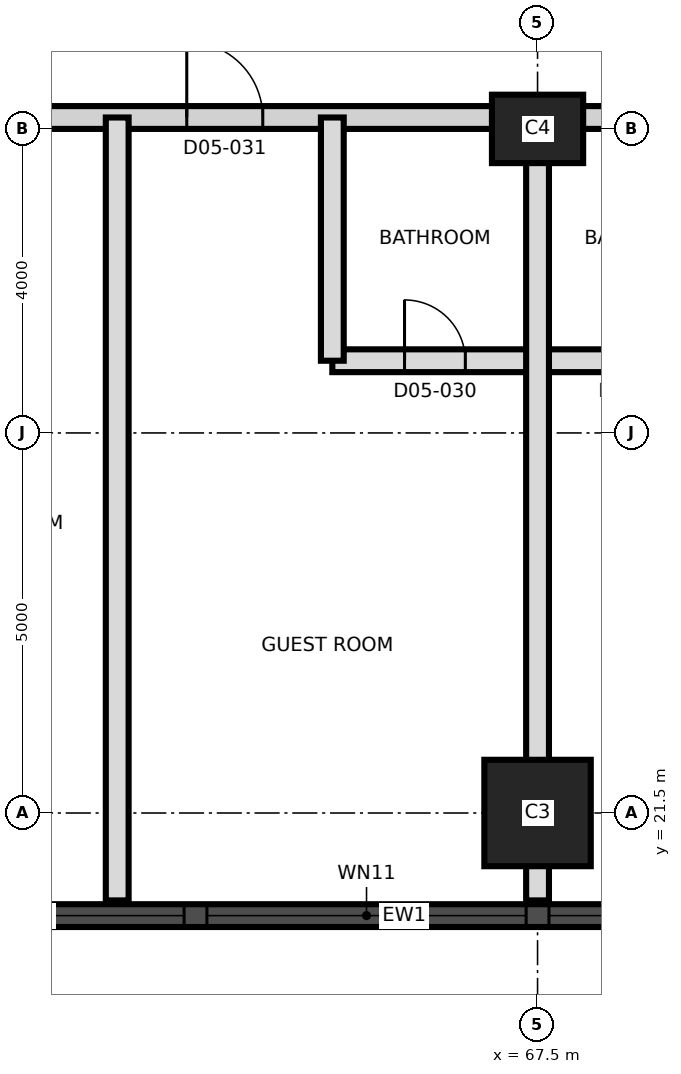
"""IFC4 building model, lengths in metres.
Left out: names, types, materials, properties, quantities, classifications, styles, units other than length and angle.
Written with IfcOpenShell. Run it as: python <this file> out.ifc"""

import sys

from ifc_helpers import new_model, si_unit, direction, frame, frame_2d, origin, origin_2d, place, context, subcontext, project, spatial, rectangle, extrude, element, fill, save


model = new_model("IFC4")
c1 = context("Model", 3, precision=1e-05, world=origin(), true_north=direction((0.0, 1.0)))
c2 = subcontext(c1, "Body", "Model", "MODEL_VIEW")
j1 = project(units=[si_unit("LENGTHUNIT", "METRE"), si_unit("PLANEANGLEUNIT", "RADIAN")], contexts=[c1])
p1 = place(None, origin())
s1 = spatial("IfcSite", under=j1, at=p1, CompositionType="ELEMENT")
p2 = place(p1, origin())
s2 = spatial("IfcBuilding", under=s1, at=p2, CompositionType="ELEMENT")
p3 = place(p2, frame((0.0, 0.0, 77.9)))
s3 = spatial("IfcBuildingStorey", under=s2, at=p3, CompositionType="ELEMENT", Elevation=77.9)
p4 = place(p3, frame((67.5, 21.5, 0.0), z_axis=(0.0, 0.0, 1.0), x_axis=(1.0, 0.0, 0.0)))
e1 = element("IfcColumn", 1, at=p4, inside=s3, PredefinedType="COLUMN", context=c2, shape_type="SweptSolid", body=[
    extrude(rectangle(XDim=1.4, YDim=1.4, at=origin_2d()), origin(), (0.0, 0.0, 1.0), 3.7),
])
p5 = place(p3, frame((67.5, 30.5, 0.0), z_axis=(0.0, 0.0, 1.0), x_axis=(1.0, 0.0, 0.0)))
e2 = element("IfcColumn", 2, at=p5, inside=s3, PredefinedType="COLUMN", context=c2, shape_type="SweptSolid", body=[
    extrude(rectangle(XDim=1.2, YDim=0.9, at=origin_2d()), origin(), (0.0, 0.0, 1.0), 3.7),
])
p6 = place(p3, frame((44.011, 20.15, 0.0), z_axis=(0.0, 0.0, 1.0), x_axis=(1.0, 0.0, 0.0)))
e3 = element("IfcWall", 3, at=p6, inside=s3, PredefinedType="SOLIDWALL", context=c2, shape_type="SweptSolid", body=[
    extrude(rectangle(XDim=43.476, YDim=0.3, at=frame_2d((21.738, 0.0))), origin(), (0.0, 0.0, 1.0), 3.4),
])
p7 = place(p6, frame((1.845, 0.0, 0.3)))
e4 = element("IfcOpeningElement", 4, at=p7, cuts=e3, PredefinedType="OPENING", context=c2, shape_type="SweptSolid", body=[
    extrude(rectangle(XDim=1.8, YDim=2.4, at=frame_2d((0.9, 1.2))), frame((0.0, 0.16, 0.0), z_axis=(0.0, -1.0, 0.0), x_axis=(1.0, 0.0, 0.0)), (0.0, 0.0, 1.0), 0.32),
])
p8 = place(p6, frame((5.639, 0.0, 0.9)))
e5 = element("IfcOpeningElement", 5, at=p8, cuts=e3, PredefinedType="OPENING", context=c2, shape_type="SweptSolid", body=[
    extrude(rectangle(XDim=4.2, YDim=1.5, at=frame_2d((2.1, 0.75))), frame((0.0, 0.16, 0.0), z_axis=(0.0, -1.0, 0.0), x_axis=(1.0, 0.0, 0.0)), (0.0, 0.0, 1.0), 0.32),
])
p9 = place(p6, frame((10.139, 0.0, 0.9)))
e6 = element("IfcOpeningElement", 6, at=p9, cuts=e3, PredefinedType="OPENING", context=c2, shape_type="SweptSolid", body=[
    extrude(rectangle(XDim=4.2, YDim=1.5, at=frame_2d((2.1, 0.75))), frame((0.0, 0.16, 0.0), z_axis=(0.0, -1.0, 0.0), x_axis=(1.0, 0.0, 0.0)), (0.0, 0.0, 1.0), 0.32),
])
p10 = place(p6, frame((14.639, 0.0, 0.9)))
e7 = element("IfcOpeningElement", 7, at=p10, cuts=e3, PredefinedType="OPENING", context=c2, shape_type="SweptSolid", body=[
    extrude(rectangle(XDim=4.2, YDim=1.5, at=frame_2d((2.1, 0.75))), frame((0.0, 0.16, 0.0), z_axis=(0.0, -1.0, 0.0), x_axis=(1.0, 0.0, 0.0)), (0.0, 0.0, 1.0), 0.32),
])
p11 = place(p6, frame((19.139, 0.0, 0.9)))
e8 = element("IfcOpeningElement", 8, at=p11, cuts=e3, PredefinedType="OPENING", context=c2, shape_type="SweptSolid", body=[
    extrude(rectangle(XDim=4.2, YDim=1.5, at=frame_2d((2.1, 0.75))), frame((0.0, 0.16, 0.0), z_axis=(0.0, -1.0, 0.0), x_axis=(1.0, 0.0, 0.0)), (0.0, 0.0, 1.0), 0.32),
])
p12 = place(p6, frame((23.639, 0.0, 0.9)))
e9 = element("IfcOpeningElement", 9, at=p12, cuts=e3, PredefinedType="OPENING", context=c2, shape_type="SweptSolid", body=[
    extrude(rectangle(XDim=4.2, YDim=1.5, at=frame_2d((2.1, 0.75))), frame((0.0, 0.16, 0.0), z_axis=(0.0, -1.0, 0.0), x_axis=(1.0, 0.0, 0.0)), (0.0, 0.0, 1.0), 0.32),
])
p13 = place(p6, frame((28.139, 0.0, 0.9)))
e10 = element("IfcOpeningElement", 10, at=p13, cuts=e3, PredefinedType="OPENING", context=c2, shape_type="SweptSolid", body=[
    extrude(rectangle(XDim=4.2, YDim=1.5, at=frame_2d((2.1, 0.75))), frame((0.0, 0.16, 0.0), z_axis=(0.0, -1.0, 0.0), x_axis=(1.0, 0.0, 0.0)), (0.0, 0.0, 1.0), 0.32),
])
p14 = place(p6, frame((32.639, 0.0, 0.9)))
e11 = element("IfcOpeningElement", 11, at=p14, cuts=e3, PredefinedType="OPENING", context=c2, shape_type="SweptSolid", body=[
    extrude(rectangle(XDim=4.2, YDim=1.5, at=frame_2d((2.1, 0.75))), frame((0.0, 0.16, 0.0), z_axis=(0.0, -1.0, 0.0), x_axis=(1.0, 0.0, 0.0)), (0.0, 0.0, 1.0), 0.32),
])
p15 = place(p6, frame((37.139, 0.0, 0.9)))
e12 = element("IfcOpeningElement", 12, at=p15, cuts=e3, PredefinedType="OPENING", context=c2, shape_type="SweptSolid", body=[
    extrude(rectangle(XDim=4.2, YDim=1.5, at=frame_2d((2.1, 0.75))), frame((0.0, 0.16, 0.0), z_axis=(0.0, -1.0, 0.0), x_axis=(1.0, 0.0, 0.0)), (0.0, 0.0, 1.0), 0.32),
])
p16 = place(p3, frame((64.8, 27.45, 0.0), z_axis=(0.0, 0.0, 1.0), x_axis=(1.0, 0.0, 0.0)))
e13 = element("IfcWall", 13, at=p16, inside=s3, PredefinedType="PARTITIONING", context=c2, shape_type="SweptSolid", body=[
    extrude(rectangle(XDim=5.4, YDim=0.3, at=frame_2d((2.7, 0.0))), origin(), (0.0, 0.0, 1.0), 3.4),
])
p17 = place(p16, frame((0.95, 0.0, 0.0)))
e14 = element("IfcOpeningElement", 14, at=p17, cuts=e13, PredefinedType="OPENING", context=c2, shape_type="SweptSolid", body=[
    extrude(rectangle(XDim=0.8, YDim=2.1, at=frame_2d((0.4, 1.05))), frame((0.0, 0.16, 0.0), z_axis=(0.0, -1.0, 0.0), x_axis=(1.0, 0.0, 0.0)), (0.0, 0.0, 1.0), 0.32),
])
p18 = place(p16, frame((3.65, 0.0, 0.0)))
e15 = element("IfcOpeningElement", 15, at=p18, cuts=e13, PredefinedType="OPENING", context=c2, shape_type="SweptSolid", body=[
    extrude(rectangle(XDim=0.8, YDim=2.1, at=frame_2d((0.4, 1.05))), frame((0.0, 0.16, 0.0), z_axis=(0.0, -1.0, 0.0), x_axis=(1.0, 0.0, 0.0)), (0.0, 0.0, 1.0), 0.32),
])
p19 = place(p3, frame((58.95, 30.65, 0.0), z_axis=(0.0, 0.0, 1.0), x_axis=(1.0, 0.0, 0.0)))
e16 = element("IfcWall", 16, at=p19, inside=s3, PredefinedType="PARTITIONING", context=c2, shape_type="SweptSolid", body=[
    extrude(rectangle(XDim=26.38, YDim=0.3, at=frame_2d((13.19, 0.0))), origin(), (0.0, 0.0, 1.0), 3.4),
])
p20 = place(p19, frame((0.685, 0.0, 0.0)))
e17 = element("IfcOpeningElement", 17, at=p20, cuts=e16, PredefinedType="OPENING", context=c2, shape_type="SweptSolid", body=[
    extrude(rectangle(XDim=1.2, YDim=2.1, at=frame_2d((0.6, 1.05))), frame((0.0, 0.16, 0.0), z_axis=(0.0, -1.0, 0.0), x_axis=(1.0, 0.0, 0.0)), (0.0, 0.0, 1.0), 0.32),
])
p21 = place(p19, frame((3.935, 0.0, 0.0)))
e18 = element("IfcOpeningElement", 18, at=p21, cuts=e16, PredefinedType="OPENING", context=c2, shape_type="SweptSolid", body=[
    extrude(rectangle(XDim=1.0, YDim=2.1, at=frame_2d((0.5, 1.05))), frame((0.0, 0.16, 0.0), z_axis=(0.0, -1.0, 0.0), x_axis=(1.0, 0.0, 0.0)), (0.0, 0.0, 1.0), 0.32),
])
p22 = place(p19, frame((11.965, 0.0, 0.0)))
e19 = element("IfcOpeningElement", 19, at=p22, cuts=e16, PredefinedType="OPENING", context=c2, shape_type="SweptSolid", body=[
    extrude(rectangle(XDim=1.0, YDim=2.1, at=frame_2d((0.5, 1.05))), frame((0.0, 0.16, 0.0), z_axis=(0.0, -1.0, 0.0), x_axis=(1.0, 0.0, 0.0)), (0.0, 0.0, 1.0), 0.32),
])
p23 = place(p19, frame((14.915, 0.0, 0.0)))
e20 = element("IfcOpeningElement", 20, at=p23, cuts=e16, PredefinedType="OPENING", context=c2, shape_type="SweptSolid", body=[
    extrude(rectangle(XDim=1.4, YDim=2.1, at=frame_2d((0.7, 1.05))), frame((0.0, 0.16, 0.0), z_axis=(0.0, -1.0, 0.0), x_axis=(1.0, 0.0, 0.0)), (0.0, 0.0, 1.0), 0.32),
])
p24 = place(p19, frame((18.685, 0.0, 0.0)))
e21 = element("IfcOpeningElement", 21, at=p24, cuts=e16, PredefinedType="OPENING", context=c2, shape_type="SweptSolid", body=[
    extrude(rectangle(XDim=1.2, YDim=2.1, at=frame_2d((0.6, 1.05))), frame((0.0, 0.16, 0.0), z_axis=(0.0, -1.0, 0.0), x_axis=(1.0, 0.0, 0.0)), (0.0, 0.0, 1.0), 0.32),
])
p25 = place(p19, frame((21.935, 0.0, 0.0)))
e22 = element("IfcOpeningElement", 22, at=p25, cuts=e16, PredefinedType="OPENING", context=c2, shape_type="SweptSolid", body=[
    extrude(rectangle(XDim=1.0, YDim=2.1, at=frame_2d((0.5, 1.05))), frame((0.0, 0.16, 0.0), z_axis=(0.0, -1.0, 0.0), x_axis=(1.0, 0.0, 0.0)), (0.0, 0.0, 1.0), 0.32),
])
p26 = place(p3, frame((61.97, 20.35, 0.0), z_axis=(0.0, 0.0, 1.0), x_axis=(0.0, 1.0, 0.0)))
e23 = element("IfcWall", 23, at=p26, inside=s3, PredefinedType="PARTITIONING", context=c2, shape_type="SweptSolid", body=[
    extrude(rectangle(XDim=10.3, YDim=0.3, at=frame_2d((5.15, 0.0))), origin(), (0.0, 0.0, 1.0), 3.4),
])
p27 = place(p3, frame((64.8, 27.45, 0.0), z_axis=(0.0, 0.0, 1.0), x_axis=(0.0, 1.0, 0.0)))
e24 = element("IfcWall", 24, at=p27, inside=s3, PredefinedType="PARTITIONING", context=c2, shape_type="SweptSolid", body=[
    extrude(rectangle(XDim=3.2, YDim=0.3, at=frame_2d((1.6, 0.0))), origin(), (0.0, 0.0, 1.0), 3.4),
])
p28 = place(p3, frame((67.5, 20.35, 0.0), z_axis=(0.0, 0.0, 1.0), x_axis=(0.0, 1.0, 0.0)))
e25 = element("IfcWall", 25, at=p28, inside=s3, PredefinedType="PARTITIONING", context=c2, shape_type="SweptSolid", body=[
    extrude(rectangle(XDim=10.3, YDim=0.3, at=frame_2d((5.15, 0.0))), origin(), (0.0, 0.0, 1.0), 3.4),
])
p29 = place(p10, origin())
e26 = element("IfcWindow", 26, at=p29, inside=s3, PartitioningType="SINGLE_PANEL", PredefinedType="WINDOW", context=c2, shape_type="SweptSolid", body=[
    extrude(rectangle(XDim=4.2, YDim=1.5, at=frame_2d((2.1, 0.75))), frame((0.0, 0.03, 0.0), z_axis=(0.0, -1.0, 0.0), x_axis=(1.0, 0.0, 0.0)), (0.0, 0.0, 1.0), 0.06),
])
fill(e7, e26)
p30 = place(p11, origin())
e27 = element("IfcWindow", 27, at=p30, inside=s3, PartitioningType="SINGLE_PANEL", PredefinedType="WINDOW", context=c2, shape_type="SweptSolid", body=[
    extrude(rectangle(XDim=4.2, YDim=1.5, at=frame_2d((2.1, 0.75))), frame((0.0, 0.03, 0.0), z_axis=(0.0, -1.0, 0.0), x_axis=(1.0, 0.0, 0.0)), (0.0, 0.0, 1.0), 0.06),
])
fill(e8, e27)
p31 = place(p12, origin())
e28 = element("IfcWindow", 28, at=p31, inside=s3, PartitioningType="SINGLE_PANEL", PredefinedType="WINDOW", context=c2, shape_type="SweptSolid", body=[
    extrude(rectangle(XDim=4.2, YDim=1.5, at=frame_2d((2.1, 0.75))), frame((0.0, 0.03, 0.0), z_axis=(0.0, -1.0, 0.0), x_axis=(1.0, 0.0, 0.0)), (0.0, 0.0, 1.0), 0.06),
])
fill(e9, e28)
p32 = place(p17, origin())
e29 = element("IfcDoor", 29, at=p32, inside=s3, OperationType="SINGLE_SWING_RIGHT", PredefinedType="DOOR", context=c2, shape_type="SweptSolid", body=[
    extrude(rectangle(XDim=0.8, YDim=2.1, at=frame_2d((0.4, 1.05))), frame((0.0, 0.025, 0.0), z_axis=(0.0, -1.0, 0.0), x_axis=(1.0, 0.0, 0.0)), (0.0, 0.0, 1.0), 0.05),
])
fill(e14, e29)
p33 = place(p21, origin())
e30 = element("IfcDoor", 30, at=p33, inside=s3, OperationType="SINGLE_SWING_LEFT", PredefinedType="DOOR", context=c2, shape_type="SweptSolid", body=[
    extrude(rectangle(XDim=1.0, YDim=2.1, at=frame_2d((0.5, 1.05))), frame((0.0, 0.025, 0.0), z_axis=(0.0, -1.0, 0.0), x_axis=(1.0, 0.0, 0.0)), (0.0, 0.0, 1.0), 0.05),
])
fill(e18, e30)
save(model, sys.argv[1])
